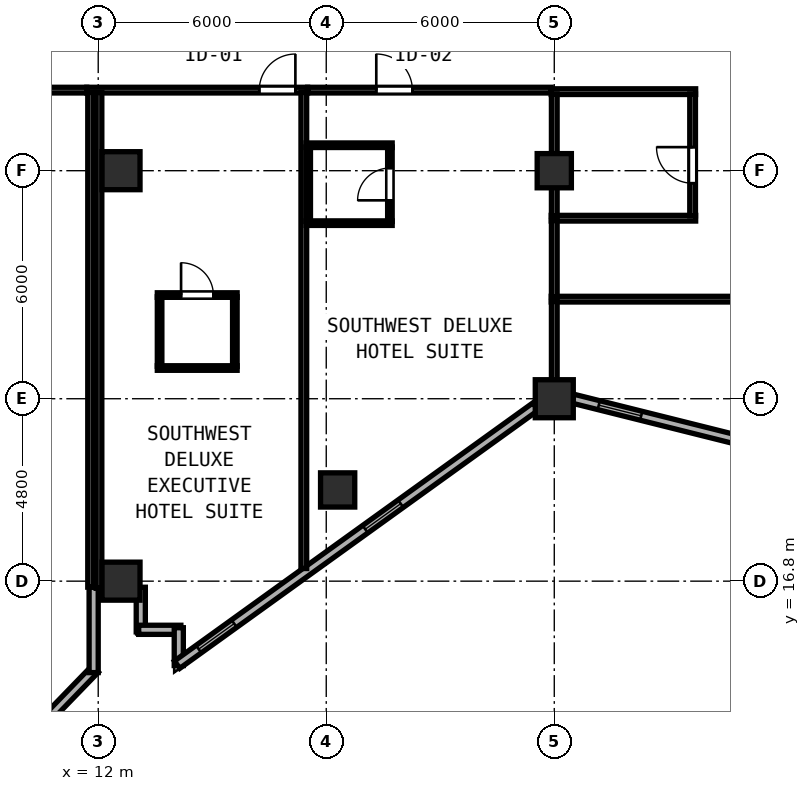
"""IFC4 building model, lengths in metres.
Left out: names, types, materials, properties, quantities, classifications, styles, units other than length and angle.
Written with IfcOpenShell. Run it as: python <this file> out.ifc"""

import sys

from ifc_helpers import new_model, si_unit, direction, frame, frame_2d, origin, origin_2d, place, context, subcontext, project, spatial, rectangle, hollow_rectangle, extrude, element, fill, save


model = new_model("IFC4")
c1 = context("Model", 3, precision=1e-05, world=origin(), true_north=direction((0.0, 1.0)))
c2 = subcontext(c1, "Body", "Model", "MODEL_VIEW")
j1 = project(units=[si_unit("LENGTHUNIT", "METRE"), si_unit("PLANEANGLEUNIT", "RADIAN")], contexts=[c1])
p1 = place(None, origin())
s1 = spatial("IfcSite", under=j1, at=p1, CompositionType="ELEMENT")
p2 = place(p1, origin())
s2 = spatial("IfcBuilding", under=s1, at=p2, CompositionType="ELEMENT")
p3 = place(p2, frame((0.0, 0.0, 106.0)))
s3 = spatial("IfcBuildingStorey", under=s2, at=p3, CompositionType="ELEMENT", Elevation=106.0)
for number, where, z_axis, x_axis in (
    (1, (24.0, 21.6, 0.0), (0.0, 0.0, 1.0), (1.0, 0.0, 0.0)),
    (2, (12.6, 16.8, 0.0), (0.0, 0.0, 1.0), (1.0, 0.0, 0.0)),
    (3, (12.6, 27.6, 0.0), (0.0, 0.0, 1.0), (1.0, 0.0, 0.0)),
):
    element("IfcColumn", number, at=place(p3, frame(where, z_axis=z_axis, x_axis=x_axis)), inside=s3, PredefinedType="COLUMN", context=c2, shape_type="SweptSolid", body=[
        extrude(hollow_rectangle(XDim=1.0, YDim=1.0, WallThickness=0.038, at=origin_2d()), origin(), (0.0, 0.0, 1.0), 3.8),
    ])
for number, where, z_axis, x_axis in (
    (4, (24.0, 27.6, 0.0), (0.0, 0.0, 1.0), (1.0, 0.0, 0.0)),
    (5, (18.3, 19.2, 0.0), (0.0, 0.0, 1.0), (1.0, 0.0, 0.0)),
):
    element("IfcColumn", number, at=place(p3, frame(where, z_axis=z_axis, x_axis=x_axis)), inside=s3, PredefinedType="COLUMN", context=c2, shape_type="SweptSolid", body=[
        extrude(hollow_rectangle(XDim=0.9, YDim=0.9, WallThickness=0.034, at=origin_2d()), origin(), (0.0, 0.0, 1.0), 3.8),
    ])
p4 = place(p3, frame((13.12, 16.64, 0.0), z_axis=(0.0, 0.0, 1.0), x_axis=(0.0, -1.0, 0.0)))
e6 = element("IfcWall", 6, at=p4, inside=s3, PredefinedType="SOLIDWALL", context=c2, shape_type="SweptSolid", body=[
    extrude(rectangle(XDim=1.175, YDim=0.24, at=frame_2d((0.587, 0.0))), origin(), (0.0, 0.0, 1.0), 3.6),
])
p5 = place(p3, frame((13.065, 15.52, 0.0), z_axis=(0.0, 0.0, 1.0), x_axis=(1.0, 0.0, 0.0)))
e7 = element("IfcWall", 7, at=p5, inside=s3, PredefinedType="SOLIDWALL", context=c2, shape_type="SweptSolid", body=[
    extrude(rectangle(XDim=1.11, YDim=0.24, at=frame_2d((0.555, 0.0))), origin(), (0.0, 0.0, 1.0), 3.6),
])
p6 = place(p3, frame((14.12, 15.575, 0.0), z_axis=(0.0, 0.0, 1.0), x_axis=(0.0, -1.0, 0.0)))
e8 = element("IfcWall", 8, at=p6, inside=s3, PredefinedType="SOLIDWALL", context=c2, shape_type="SweptSolid", body=[
    extrude(rectangle(XDim=0.996, YDim=0.24, at=frame_2d((0.498, 0.0))), origin(), (0.0, 0.0, 1.0), 3.6),
])
p7 = place(p3, frame((14.075, 14.602, 0.0), z_axis=(0.0, 0.0, 1.0), x_axis=(0.811543504691, 0.584291998913, 0.0)))
e9 = element("IfcWall", 9, at=p7, inside=s3, PredefinedType="SOLIDWALL", context=c2, shape_type="SweptSolid", body=[
    extrude(rectangle(XDim=11.623, YDim=0.24, at=frame_2d((5.812, 0.0))), origin(), (0.0, 0.0, 1.0), 3.145),
])
p8 = place(p7, frame((0.7, 0.0, 0.85)))
e10 = element("IfcOpeningElement", 10, at=p8, cuts=e9, PredefinedType="OPENING", context=c2, shape_type="SweptSolid", body=[
    extrude(rectangle(XDim=1.15, YDim=1.8, at=frame_2d((0.575, 0.9))), frame((0.0, 0.13, 0.0), z_axis=(0.0, -1.0, 0.0), x_axis=(1.0, 0.0, 0.0)), (0.0, 0.0, 1.0), 0.26),
])
p9 = place(p7, frame((6.1, 0.0, 0.85)))
e11 = element("IfcOpeningElement", 11, at=p9, cuts=e9, PredefinedType="OPENING", context=c2, shape_type="SweptSolid", body=[
    extrude(rectangle(XDim=1.15, YDim=1.8, at=frame_2d((0.575, 0.9))), frame((0.0, 0.13, 0.0), z_axis=(0.0, -1.0, 0.0), x_axis=(1.0, 0.0, 0.0)), (0.0, 0.0, 1.0), 0.26),
])
p10 = place(p3, frame((24.492, 21.601, 0.0), z_axis=(0.0, 0.0, 1.0), x_axis=(0.970145683738, -0.242522890311, 0.0)))
e12 = element("IfcWall", 12, at=p10, inside=s3, PredefinedType="SOLIDWALL", context=c2, shape_type="SweptSolid", body=[
    extrude(rectangle(XDim=4.511, YDim=0.24, at=frame_2d((2.255, 0.0))), origin(), (0.0, 0.0, 1.0), 3.145),
])
p11 = place(p10, frame((0.7, 0.0, 0.85)))
e13 = element("IfcOpeningElement", 13, at=p11, cuts=e12, PredefinedType="OPENING", context=c2, shape_type="SweptSolid", body=[
    extrude(rectangle(XDim=1.15, YDim=1.8, at=frame_2d((0.575, 0.9))), frame((0.0, 0.13, 0.0), z_axis=(0.0, -1.0, 0.0), x_axis=(1.0, 0.0, 0.0)), (0.0, 0.0, 1.0), 0.26),
])
p12 = place(p3, frame((4.813, 7.148, 0.0), z_axis=(0.0, 0.0, 1.0), x_axis=(0.695506215319, 0.718520079366, 0.0)))
e14 = element("IfcWall", 14, at=p12, inside=s3, PredefinedType="SOLIDWALL", context=c2, shape_type="SweptSolid", body=[
    extrude(rectangle(XDim=10.216, YDim=0.24, at=frame_2d((5.108, 0.0))), origin(), (0.0, 0.0, 1.0), 3.6),
])
p13 = place(p12, frame((0.7, 0.0, 0.85)))
e15 = element("IfcOpeningElement", 15, at=p13, cuts=e14, PredefinedType="OPENING", context=c2, shape_type="SweptSolid", body=[
    extrude(rectangle(XDim=1.15, YDim=1.8, at=frame_2d((0.575, 0.9))), frame((0.0, 0.13, 0.0), z_axis=(0.0, -1.0, 0.0), x_axis=(1.0, 0.0, 0.0)), (0.0, 0.0, 1.0), 0.26),
])
p14 = place(p12, frame((6.1, 0.0, 0.85)))
e16 = element("IfcOpeningElement", 16, at=p14, cuts=e14, PredefinedType="OPENING", context=c2, shape_type="SweptSolid", body=[
    extrude(rectangle(XDim=1.15, YDim=1.8, at=frame_2d((0.575, 0.9))), frame((0.0, 0.13, 0.0), z_axis=(0.0, -1.0, 0.0), x_axis=(1.0, 0.0, 0.0)), (0.0, 0.0, 1.0), 0.26),
])
p15 = place(p3, frame((11.88, 14.394, 0.0), z_axis=(0.0, 0.0, 1.0), x_axis=(0.0, 1.0, 0.0)))
e17 = element("IfcWall", 17, at=p15, inside=s3, PredefinedType="SOLIDWALL", context=c2, shape_type="SweptSolid", body=[
    extrude(rectangle(XDim=2.246, YDim=0.24, at=frame_2d((1.123, 0.0))), origin(), (0.0, 0.0, 1.0), 3.6),
])
for number, where, z_axis, x_axis in (
    (18, (23.92, 29.68, 0.0), (0.0, 0.0, 1.0), (1.0, 0.0, 0.0)),
    (19, (23.92, 26.35, 0.0), (0.0, 0.0, 1.0), (1.0, 0.0, 0.0)),
):
    element("IfcWall", number, at=place(p3, frame(where, z_axis=z_axis, x_axis=x_axis)), inside=s3, PredefinedType="PARTITIONING", context=c2, shape_type="SweptSolid", body=[
        extrude(rectangle(XDim=3.8, YDim=0.15, at=frame_2d((1.9, 0.0))), origin(), (0.0, 0.0, 1.0), 3.6),
    ])
p16 = place(p3, frame((24.0, 26.41, 0.0), z_axis=(0.0, 0.0, 1.0), x_axis=(0.0, 1.0, 0.0)))
e20 = element("IfcWall", 20, at=p16, inside=s3, PredefinedType="PARTITIONING", context=c2, shape_type="SweptSolid", body=[
    extrude(rectangle(XDim=3.21, YDim=0.15, at=frame_2d((1.605, 0.0))), origin(), (0.0, 0.0, 1.0), 3.145),
])
p17 = place(p3, frame((27.64, 26.41, 0.0), z_axis=(0.0, 0.0, 1.0), x_axis=(0.0, 1.0, 0.0)))
e21 = element("IfcWall", 21, at=p17, inside=s3, PredefinedType="PARTITIONING", context=c2, shape_type="SweptSolid", body=[
    extrude(rectangle(XDim=3.21, YDim=0.15, at=frame_2d((1.605, 0.0))), origin(), (0.0, 0.0, 1.0), 3.6),
])
p18 = place(p17, frame((1.81, 0.0, 0.0), z_axis=(0.0, 0.0, 1.0), x_axis=(-1.0, 0.0, 0.0)))
e22 = element("IfcOpeningElement", 22, at=p18, cuts=e21, PredefinedType="OPENING", context=c2, shape_type="SweptSolid", body=[
    extrude(rectangle(XDim=0.95, YDim=2.12, at=frame_2d((0.475, 1.06))), frame((0.0, 0.085, 0.0), z_axis=(0.0, -1.0, 0.0), x_axis=(1.0, 0.0, 0.0)), (0.0, 0.0, 1.0), 0.17),
])
p19 = place(p3, frame((23.92, 24.22, 0.0), z_axis=(0.0, 0.0, 1.0), x_axis=(1.0, 0.0, 0.0)))
e23 = element("IfcWall", 23, at=p19, inside=s3, PredefinedType="PARTITIONING", context=c2, shape_type="SweptSolid", body=[
    extrude(rectangle(XDim=7.36, YDim=0.15, at=frame_2d((3.68, 0.0))), origin(), (0.0, 0.0, 1.0), 3.6),
])
p20 = place(p19, frame((5.845, 0.0, 0.0), z_axis=(0.0, 0.0, 1.0), x_axis=(-1.0, 0.0, 0.0)))
e24 = element("IfcOpeningElement", 24, at=p20, cuts=e23, PredefinedType="OPENING", context=c2, shape_type="SweptSolid", body=[
    extrude(rectangle(XDim=0.95, YDim=2.12, at=frame_2d((0.475, 1.06))), frame((0.0, 0.085, 0.0), z_axis=(0.0, -1.0, 0.0), x_axis=(1.0, 0.0, 0.0)), (0.0, 0.0, 1.0), 0.17),
])
p21 = place(p3, frame((24.0, 21.819, 0.0), z_axis=(0.0, 0.0, 1.0), x_axis=(0.0, 1.0, 0.0)))
e25 = element("IfcWall", 25, at=p21, inside=s3, PredefinedType="PARTITIONING", context=c2, shape_type="SweptSolid", body=[
    extrude(rectangle(XDim=2.341, YDim=0.15, at=frame_2d((1.171, 0.0))), origin(), (0.0, 0.0, 1.0), 3.145),
])
p22 = place(p3, frame((11.7, 29.72, 0.0), z_axis=(0.0, 0.0, 1.0), x_axis=(1.0, 0.0, 0.0)))
e26 = element("IfcWall", 26, at=p22, inside=s3, PredefinedType="PARTITIONING", context=c2, shape_type="SweptSolid", body=[
    extrude(rectangle(XDim=5.81, YDim=0.15, at=frame_2d((2.905, 0.0))), origin(), (0.0, 0.0, 1.0), 3.6),
])
p23 = place(p22, frame((5.488, 0.0, 0.0), z_axis=(0.0, 0.0, 1.0), x_axis=(-1.0, 0.0, 0.0)))
e27 = element("IfcOpeningElement", 27, at=p23, cuts=e26, PredefinedType="OPENING", context=c2, shape_type="SweptSolid", body=[
    extrude(rectangle(XDim=0.95, YDim=2.18, at=frame_2d((0.475, 1.09))), frame((0.0, 0.085, 0.0), z_axis=(0.0, -1.0, 0.0), x_axis=(1.0, 0.0, 0.0)), (0.0, 0.0, 1.0), 0.17),
])
p24 = place(p3, frame((11.8, 16.642, 0.0), z_axis=(0.0, 0.0, 1.0), x_axis=(0.0, 1.0, 0.0)))
e28 = element("IfcWall", 28, at=p24, inside=s3, PredefinedType="PARTITIONING", context=c2, shape_type="SweptSolid", body=[
    extrude(rectangle(XDim=13.018, YDim=0.15, at=frame_2d((6.509, 0.0))), origin(), (0.0, 0.0, 1.0), 3.6),
])
p25 = place(p3, frame((17.41, 17.133, 0.0), z_axis=(0.0, 0.0, 1.0), x_axis=(0.0, 1.0, 0.0)))
e29 = element("IfcWall", 29, at=p25, inside=s3, PredefinedType="PARTITIONING", context=c2, shape_type="SweptSolid", body=[
    extrude(rectangle(XDim=12.527, YDim=0.15, at=frame_2d((6.264, 0.0))), origin(), (0.0, 0.0, 1.0), 3.6),
])
p26 = place(p3, frame((13.555, 24.328, 0.0), z_axis=(0.0, 0.0, 1.0), x_axis=(1.0, 0.0, 0.0)))
e30 = element("IfcWall", 30, at=p26, inside=s3, PredefinedType="PARTITIONING", context=c2, shape_type="SweptSolid", body=[
    extrude(rectangle(XDim=2.1, YDim=0.12, at=frame_2d((1.05, 0.0))), origin(), (0.0, 0.0, 1.0), 3.6),
])
p27 = place(p26, frame((1.475, 0.0, 0.0), z_axis=(0.0, 0.0, 1.0), x_axis=(-1.0, 0.0, 0.0)))
e31 = element("IfcOpeningElement", 31, at=p27, cuts=e30, PredefinedType="OPENING", context=c2, shape_type="SweptSolid", body=[
    extrude(rectangle(XDim=0.85, YDim=2.1, at=frame_2d((0.425, 1.05))), frame((0.0, 0.07, 0.0), z_axis=(0.0, -1.0, 0.0), x_axis=(1.0, 0.0, 0.0)), (0.0, 0.0, 1.0), 0.14),
])
p28 = place(p3, frame((13.555, 22.408, 0.0), z_axis=(0.0, 0.0, 1.0), x_axis=(1.0, 0.0, 0.0)))
e32 = element("IfcWall", 32, at=p28, inside=s3, PredefinedType="PARTITIONING", context=c2, shape_type="SweptSolid", body=[
    extrude(rectangle(XDim=2.1, YDim=0.12, at=frame_2d((1.05, 0.0))), origin(), (0.0, 0.0, 1.0), 3.6),
])
for number, where, z_axis, x_axis in (
    (33, (13.615, 22.453, 0.0), (0.0, 0.0, 1.0), (0.0, 1.0, 0.0)),
    (34, (15.595, 22.453, 0.0), (0.0, 0.0, 1.0), (0.0, 1.0, 0.0)),
):
    element("IfcWall", number, at=place(p3, frame(where, z_axis=z_axis, x_axis=x_axis)), inside=s3, PredefinedType="PARTITIONING", context=c2, shape_type="SweptSolid", body=[
        extrude(rectangle(XDim=1.83, YDim=0.12, at=frame_2d((0.915, 0.0))), origin(), (0.0, 0.0, 1.0), 3.6),
    ])
p29 = place(p3, frame((17.512, 29.72, 0.0), z_axis=(0.0, 0.0, 1.0), x_axis=(1.0, 0.0, 0.0)))
e35 = element("IfcWall", 35, at=p29, inside=s3, PredefinedType="PARTITIONING", context=c2, shape_type="SweptSolid", body=[
    extrude(rectangle(XDim=6.406, YDim=0.15, at=frame_2d((3.203, 0.0))), origin(), (0.0, 0.0, 1.0), 3.6),
])
p30 = place(p29, frame((2.755, 0.0, 0.0), z_axis=(0.0, 0.0, 1.0), x_axis=(-1.0, 0.0, 0.0)))
e36 = element("IfcOpeningElement", 36, at=p30, cuts=e35, PredefinedType="OPENING", context=c2, shape_type="SweptSolid", body=[
    extrude(rectangle(XDim=0.95, YDim=2.18, at=frame_2d((0.475, 1.09))), frame((0.0, 0.085, 0.0), z_axis=(0.0, -1.0, 0.0), x_axis=(1.0, 0.0, 0.0)), (0.0, 0.0, 1.0), 0.17),
])
p31 = place(p3, frame((24.0, 24.28, 0.0), z_axis=(0.0, 0.0, 1.0), x_axis=(0.0, 1.0, 0.0)))
e37 = element("IfcWall", 37, at=p31, inside=s3, PredefinedType="PARTITIONING", context=c2, shape_type="SweptSolid", body=[
    extrude(rectangle(XDim=2.01, YDim=0.15, at=frame_2d((1.005, 0.0))), origin(), (0.0, 0.0, 1.0), 3.145),
])
for number, where, z_axis, x_axis in (
    (38, (17.47, 28.27, 0.0), (0.0, 0.0, 1.0), (1.0, 0.0, 0.0)),
    (39, (17.47, 26.22, 0.0), (0.0, 0.0, 1.0), (1.0, 0.0, 0.0)),
):
    element("IfcWall", number, at=place(p3, frame(where, z_axis=z_axis, x_axis=x_axis)), inside=s3, PredefinedType="PARTITIONING", context=c2, shape_type="SweptSolid", body=[
        extrude(rectangle(XDim=2.265, YDim=0.12, at=frame_2d((1.133, 0.0))), origin(), (0.0, 0.0, 1.0), 3.6),
    ])
p32 = place(p3, frame((17.525, 26.265, 0.0), z_axis=(0.0, 0.0, 1.0), x_axis=(0.0, 1.0, 0.0)))
e40 = element("IfcWall", 40, at=p32, inside=s3, PredefinedType="PARTITIONING", context=c2, shape_type="SweptSolid", body=[
    extrude(rectangle(XDim=1.96, YDim=0.12, at=frame_2d((0.98, 0.0))), origin(), (0.0, 0.0, 1.0), 3.6),
])
p33 = place(p3, frame((19.675, 26.265, 0.0), z_axis=(0.0, 0.0, 1.0), x_axis=(0.0, 1.0, 0.0)))
e41 = element("IfcWall", 41, at=p33, inside=s3, PredefinedType="PARTITIONING", context=c2, shape_type="SweptSolid", body=[
    extrude(rectangle(XDim=1.96, YDim=0.12, at=frame_2d((0.98, 0.0))), origin(), (0.0, 0.0, 1.0), 3.6),
])
p34 = place(p33, frame((0.555, 0.0, 0.0)))
e42 = element("IfcOpeningElement", 42, at=p34, cuts=e41, PredefinedType="OPENING", context=c2, shape_type="SweptSolid", body=[
    extrude(rectangle(XDim=0.85, YDim=2.1, at=frame_2d((0.425, 1.05))), frame((0.0, 0.07, 0.0), z_axis=(0.0, -1.0, 0.0), x_axis=(1.0, 0.0, 0.0)), (0.0, 0.0, 1.0), 0.14),
])
p35 = place(p3, frame((3.889, 29.72, 0.0), z_axis=(0.0, 0.0, 1.0), x_axis=(1.0, 0.0, 0.0)))
e43 = element("IfcWall", 43, at=p35, inside=s3, PredefinedType="PARTITIONING", context=c2, shape_type="SweptSolid", body=[
    extrude(rectangle(XDim=7.809, YDim=0.15, at=frame_2d((3.905, 0.0))), origin(), (0.0, 0.0, 1.0), 3.6),
])
p36 = place(p35, frame((4.205, 0.0, 0.0), z_axis=(0.0, 0.0, 1.0), x_axis=(-1.0, 0.0, 0.0)))
e44 = element("IfcOpeningElement", 44, at=p36, cuts=e43, PredefinedType="OPENING", context=c2, shape_type="SweptSolid", body=[
    extrude(rectangle(XDim=0.95, YDim=2.18, at=frame_2d((0.475, 1.09))), frame((0.0, 0.085, 0.0), z_axis=(0.0, -1.0, 0.0), x_axis=(1.0, 0.0, 0.0)), (0.0, 0.0, 1.0), 0.17),
])
p37 = place(p3, frame((12.02, 16.612, 0.0), z_axis=(0.0, 0.0, 1.0), x_axis=(0.0, 1.0, 0.0)))
e45 = element("IfcWall", 45, at=p37, inside=s3, PredefinedType="PARTITIONING", context=c2, shape_type="SweptSolid", body=[
    extrude(rectangle(XDim=13.048, YDim=0.15, at=frame_2d((6.524, 0.0))), origin(), (0.0, 0.0, 1.0), 3.6),
])
p38 = place(p8, origin())
e46 = element("IfcWindow", 46, at=p38, inside=s3, PartitioningType="SINGLE_PANEL", PredefinedType="WINDOW", context=c2, shape_type="SweptSolid", body=[
    extrude(rectangle(XDim=1.15, YDim=1.8, at=frame_2d((0.575, 0.9))), frame((0.0, 0.03, 0.0), z_axis=(0.0, -1.0, 0.0), x_axis=(1.0, 0.0, 0.0)), (0.0, 0.0, 1.0), 0.06),
])
fill(e10, e46)
p39 = place(p9, origin())
e47 = element("IfcWindow", 47, at=p39, inside=s3, PartitioningType="SINGLE_PANEL", PredefinedType="WINDOW", context=c2, shape_type="SweptSolid", body=[
    extrude(rectangle(XDim=1.15, YDim=1.8, at=frame_2d((0.575, 0.9))), frame((0.0, 0.03, 0.0), z_axis=(0.0, -1.0, 0.0), x_axis=(1.0, 0.0, 0.0)), (0.0, 0.0, 1.0), 0.06),
])
fill(e11, e47)
p40 = place(p11, origin())
e48 = element("IfcWindow", 48, at=p40, inside=s3, PartitioningType="SINGLE_PANEL", PredefinedType="WINDOW", context=c2, shape_type="SweptSolid", body=[
    extrude(rectangle(XDim=1.15, YDim=1.8, at=frame_2d((0.575, 0.9))), frame((0.0, 0.03, 0.0), z_axis=(0.0, -1.0, 0.0), x_axis=(1.0, 0.0, 0.0)), (0.0, 0.0, 1.0), 0.06),
])
fill(e13, e48)
p41 = place(p18, origin())
e49 = element("IfcDoor", 49, at=p41, inside=s3, OperationType="SINGLE_SWING_LEFT", PredefinedType="DOOR", context=c2, shape_type="SweptSolid", body=[
    extrude(rectangle(XDim=0.95, YDim=2.12, at=frame_2d((0.475, 1.06))), frame((0.0, 0.025, 0.0), z_axis=(0.0, -1.0, 0.0), x_axis=(1.0, 0.0, 0.0)), (0.0, 0.0, 1.0), 0.05),
])
fill(e22, e49)
p42 = place(p23, origin())
e50 = element("IfcDoor", 50, at=p42, inside=s3, OperationType="SINGLE_SWING_LEFT", PredefinedType="DOOR", context=c2, shape_type="SweptSolid", body=[
    extrude(rectangle(XDim=0.95, YDim=2.18, at=frame_2d((0.475, 1.09))), frame((0.0, 0.025, 0.0), z_axis=(0.0, -1.0, 0.0), x_axis=(1.0, 0.0, 0.0)), (0.0, 0.0, 1.0), 0.05),
])
fill(e27, e50)
p43 = place(p27, origin())
e51 = element("IfcDoor", 51, at=p43, inside=s3, OperationType="SINGLE_SWING_RIGHT", PredefinedType="DOOR", context=c2, shape_type="SweptSolid", body=[
    extrude(rectangle(XDim=0.85, YDim=2.1, at=frame_2d((0.425, 1.05))), frame((0.0, 0.025, 0.0), z_axis=(0.0, -1.0, 0.0), x_axis=(1.0, 0.0, 0.0)), (0.0, 0.0, 1.0), 0.05),
])
fill(e31, e51)
p44 = place(p30, origin())
e52 = element("IfcDoor", 52, at=p44, inside=s3, OperationType="SINGLE_SWING_RIGHT", PredefinedType="DOOR", context=c2, shape_type="SweptSolid", body=[
    extrude(rectangle(XDim=0.95, YDim=2.18, at=frame_2d((0.475, 1.09))), frame((0.0, 0.025, 0.0), z_axis=(0.0, -1.0, 0.0), x_axis=(1.0, 0.0, 0.0)), (0.0, 0.0, 1.0), 0.05),
])
fill(e36, e52)
p45 = place(p34, origin())
e53 = element("IfcDoor", 53, at=p45, inside=s3, OperationType="SINGLE_SWING_LEFT", PredefinedType="DOOR", context=c2, shape_type="SweptSolid", body=[
    extrude(rectangle(XDim=0.85, YDim=2.1, at=frame_2d((0.425, 1.05))), frame((0.0, 0.025, 0.0), z_axis=(0.0, -1.0, 0.0), x_axis=(1.0, 0.0, 0.0)), (0.0, 0.0, 1.0), 0.05),
])
fill(e42, e53)
save(model, sys.argv[1])
